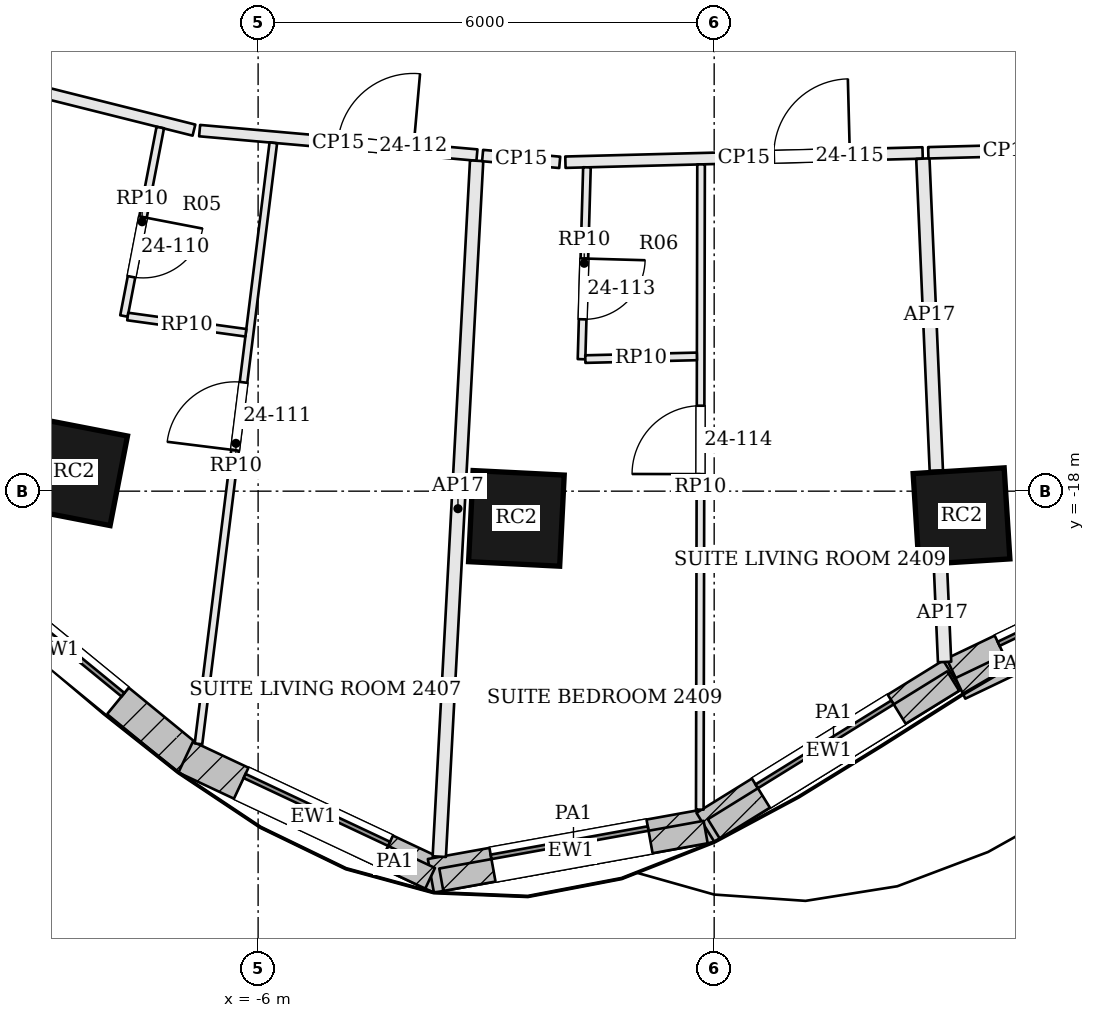
"""IFC4 building model, lengths in metres.
Left out: names, types, materials, properties, quantities, classifications, styles, units other than length and angle.
Written with IfcOpenShell. Run it as: python <this file> out.ifc"""

import sys

from ifc_helpers import new_model, si_unit, direction, frame, frame_2d, origin, origin_2d, place, context, subcontext, project, spatial, rectangle, extrude, element, fill, save


model = new_model("IFC4")
c1 = context("Model", 3, precision=1e-05, world=origin(), true_north=direction((0.0, 1.0)))
c2 = subcontext(c1, "Body", "Model", "MODEL_VIEW")
j1 = project(units=[si_unit("LENGTHUNIT", "METRE"), si_unit("PLANEANGLEUNIT", "RADIAN")], contexts=[c1])
p1 = place(None, origin())
s1 = spatial("IfcSite", under=j1, at=p1, CompositionType="ELEMENT")
p2 = place(p1, origin())
s2 = spatial("IfcBuilding", under=s1, at=p2, CompositionType="ELEMENT")
p3 = place(p2, frame((0.0, 0.0, 103.2)))
s3 = spatial("IfcBuildingStorey", under=s2, at=p3, CompositionType="ELEMENT", Elevation=103.2)
for number, where, z_axis, x_axis in (
    (1, (-8.422, -17.749, 0.0), (0.0, 0.0, 1.0), (0.982, -0.191, 0.0)),
    (2, (-2.602, -18.358, 0.0), (0.0, 0.0, 1.0), (0.999, -0.05, 0.0)),
    (3, (3.254, -18.33, 0.0), (0.0, 0.0, 1.0), (0.998, 0.063, 0.0)),
):
    element("IfcColumn", number, at=place(p3, frame(where, z_axis=z_axis, x_axis=x_axis)), inside=s3, PredefinedType="COLUMN", context=c2, shape_type="SweptSolid", body=[
        extrude(rectangle(XDim=1.2, YDim=1.2, at=origin_2d()), origin(), (0.0, 0.0, 1.0), 3.6),
    ])
p4 = place(p3, frame((-10.407, -18.661, 0.0), z_axis=(0.0, 0.0, 1.0), x_axis=(0.773702458947, -0.633549133864, 0.0)))
e4 = element("IfcWall", 4, at=p4, inside=s3, PredefinedType="SOLIDWALL", context=c2, shape_type="SweptSolid", body=[
    extrude(rectangle(XDim=4.526, YDim=0.45, at=frame_2d((2.263, 0.0))), origin(), (0.0, 0.0, 1.0), 3.4),
])
p5 = place(p4, frame((1.213, 0.0, 0.9)))
e5 = element("IfcOpeningElement", 5, at=p5, cuts=e4, PredefinedType="OPENING", context=c2, shape_type="SweptSolid", body=[
    extrude(rectangle(XDim=2.1, YDim=2.0, at=frame_2d((1.05, 1.0))), frame((0.0, 0.235, 0.0), z_axis=(0.0, -1.0, 0.0), x_axis=(1.0, 0.0, 0.0)), (0.0, 0.0, 1.0), 0.47),
])
p6 = place(p3, frame((-6.953, -21.499, 0.0), z_axis=(0.0, 0.0, 1.0), x_axis=(0.905034581957, -0.425337989676, 0.0)))
e6 = element("IfcWall", 6, at=p6, inside=s3, PredefinedType="SOLIDWALL", context=c2, shape_type="SweptSolid", body=[
    extrude(rectangle(XDim=3.714, YDim=0.45, at=frame_2d((1.857, 0.0))), origin(), (0.0, 0.0, 1.0), 3.4),
])
p7 = place(p6, frame((0.807, 0.0, 0.9)))
e7 = element("IfcOpeningElement", 7, at=p7, cuts=e6, PredefinedType="OPENING", context=c2, shape_type="SweptSolid", body=[
    extrude(rectangle(XDim=2.1, YDim=2.0, at=frame_2d((1.05, 1.0))), frame((0.0, 0.235, 0.0), z_axis=(0.0, -1.0, 0.0), x_axis=(1.0, 0.0, 0.0)), (0.0, 0.0, 1.0), 0.47),
])
p8 = place(p3, frame((-3.727, -23.061, 0.0), z_axis=(0.0, 0.0, 1.0), x_axis=(0.984119180424, 0.177508982087, 0.0)))
e8 = element("IfcWall", 8, at=p8, inside=s3, PredefinedType="SOLIDWALL", context=c2, shape_type="SweptSolid", body=[
    extrude(rectangle(XDim=3.747, YDim=0.45, at=frame_2d((1.873, 0.0))), origin(), (0.0, 0.0, 1.0), 3.4),
])
p9 = place(p8, frame((0.823, 0.0, 0.9)))
e9 = element("IfcOpeningElement", 9, at=p9, cuts=e8, PredefinedType="OPENING", context=c2, shape_type="SweptSolid", body=[
    extrude(rectangle(XDim=2.1, YDim=2.0, at=frame_2d((1.05, 1.0))), frame((0.0, 0.235, 0.0), z_axis=(0.0, -1.0, 0.0), x_axis=(1.0, 0.0, 0.0)), (0.0, 0.0, 1.0), 0.47),
])
p10 = place(p3, frame((-0.115, -22.424, 0.0), z_axis=(0.0, 0.0, 1.0), x_axis=(0.8506970368, 0.525656305564, 0.0)))
e10 = element("IfcWall", 10, at=p10, inside=s3, PredefinedType="SOLIDWALL", context=c2, shape_type="SweptSolid", body=[
    extrude(rectangle(XDim=3.816, YDim=0.45, at=frame_2d((1.908, 0.0))), origin(), (0.0, 0.0, 1.0), 3.4),
])
p11 = place(p10, frame((0.858, 0.0, 0.9)))
e11 = element("IfcOpeningElement", 11, at=p11, cuts=e10, PredefinedType="OPENING", context=c2, shape_type="SweptSolid", body=[
    extrude(rectangle(XDim=2.1, YDim=2.0, at=frame_2d((1.05, 1.0))), frame((0.0, 0.235, 0.0), z_axis=(0.0, -1.0, 0.0), x_axis=(1.0, 0.0, 0.0)), (0.0, 0.0, 1.0), 0.47),
])
p12 = place(p3, frame((3.154, -20.406, 0.0), z_axis=(0.0, 0.0, 1.0), x_axis=(0.902333313, 0.431038968367, 0.0)))
e12 = element("IfcWall", 12, at=p12, inside=s3, PredefinedType="SOLIDWALL", context=c2, shape_type="SweptSolid", body=[
    extrude(rectangle(XDim=3.505, YDim=0.45, at=frame_2d((1.753, 0.0))), origin(), (0.0, 0.0, 1.0), 3.4),
])
p13 = place(p12, frame((0.703, 0.0, 0.9)))
e13 = element("IfcOpeningElement", 13, at=p13, cuts=e12, PredefinedType="OPENING", context=c2, shape_type="SweptSolid", body=[
    extrude(rectangle(XDim=2.1, YDim=2.0, at=frame_2d((1.05, 1.0))), frame((0.0, 0.235, 0.0), z_axis=(0.0, -1.0, 0.0), x_axis=(1.0, 0.0, 0.0)), (0.0, 0.0, 1.0), 0.47),
])
p14 = place(p3, frame((-4.667, -22.656, 3.6), z_axis=(0.0, 0.0, 1.0), x_axis=(0.905050240273, -0.425304670304, 0.0)))
e14 = element("IfcWall", 14, at=p14, inside=s3, PredefinedType="PARAPET", context=c2, shape_type="SweptSolid", body=[
    extrude(rectangle(XDim=1.027, YDim=0.3, at=frame_2d((0.513, 0.0))), origin(), (0.0, 0.0, 1.0), 1.1),
])
p15 = place(p3, frame((-3.59, -23.112, 3.6), z_axis=(0.0, 0.0, 1.0), x_axis=(0.984124248147, 0.177480884064, 0.0)))
e15 = element("IfcWall", 15, at=p15, inside=s3, PredefinedType="PARAPET", context=c2, shape_type="SweptSolid", body=[
    extrude(rectangle(XDim=3.534, YDim=0.3, at=frame_2d((1.767, 0.0))), origin(), (0.0, 0.0, 1.0), 1.1),
])
p16 = place(p3, frame((-0.005, -22.444, 3.6), z_axis=(0.0, 0.0, 1.0), x_axis=(0.850710394144, 0.525634688063, 0.0)))
e16 = element("IfcWall", 16, at=p16, inside=s3, PredefinedType="PARAPET", context=c2, shape_type="SweptSolid", body=[
    extrude(rectangle(XDim=3.702, YDim=0.3, at=frame_2d((1.851, 0.0))), origin(), (0.0, 0.0, 1.0), 1.1),
])
p17 = place(p3, frame((3.239, -20.594, 3.6), z_axis=(0.0, 0.0, 1.0), x_axis=(0.902344893923, 0.431014724123, 0.0)))
e17 = element("IfcWall", 17, at=p17, inside=s3, PredefinedType="PARAPET", context=c2, shape_type="SweptSolid", body=[
    extrude(rectangle(XDim=1.49, YDim=0.3, at=frame_2d((0.745, 0.0))), origin(), (0.0, 0.0, 1.0), 1.1),
])
p18 = place(p3, frame((-11.387, -12.111, 0.0), z_axis=(0.0, 0.0, 1.0), x_axis=(0.96999205549, -0.243136612393, 0.0)))
e18 = element("IfcWall", 18, at=p18, inside=s3, PredefinedType="PARTITIONING", context=c2, shape_type="SweptSolid", body=[
    extrude(rectangle(XDim=4.683, YDim=0.15, at=frame_2d((2.342, 0.0))), origin(), (0.0, 0.0, 1.0), 2.784),
])
p19 = place(p3, frame((-6.77, -13.257, 0.0), z_axis=(0.0, 0.0, 1.0), x_axis=(0.996139113685, -0.087788758881, 0.0)))
e19 = element("IfcWall", 19, at=p19, inside=s3, PredefinedType="PARTITIONING", context=c2, shape_type="SweptSolid", body=[
    extrude(rectangle(XDim=3.663, YDim=0.15, at=frame_2d((1.831, 0.0))), origin(), (0.0, 0.0, 1.0), 2.784),
])
p20 = place(p19, frame((1.823, 0.0, 0.0)))
e20 = element("IfcOpeningElement", 20, at=p20, cuts=e19, PredefinedType="OPENING", context=c2, shape_type="SweptSolid", body=[
    extrude(rectangle(XDim=1.0, YDim=2.1, at=frame_2d((0.5, 1.05))), frame((0.0, 0.085, 0.0), z_axis=(0.0, -1.0, 0.0), x_axis=(1.0, 0.0, 0.0)), (0.0, 0.0, 1.0), 0.17),
])
p21 = place(p3, frame((-3.616, -22.808, 0.0), z_axis=(0.0, 0.0, 1.0), x_axis=(0.053604251486, 0.998562258561, 0.0)))
e21 = element("IfcWall", 21, at=p21, inside=s3, PredefinedType="PARTITIONING", context=c2, shape_type="SweptSolid", body=[
    extrude(rectangle(XDim=9.168, YDim=0.175, at=frame_2d((4.584, 0.0))), origin(), (0.0, 0.0, 1.0), 2.784),
])
p22 = place(p3, frame((-3.046, -13.585, 0.0), z_axis=(0.0, 0.0, 1.0), x_axis=(0.99614280397, -0.087746875151, 0.0)))
e22 = element("IfcWall", 22, at=p22, inside=s3, PredefinedType="PARTITIONING", context=c2, shape_type="SweptSolid", body=[
    extrude(rectangle(XDim=1.018, YDim=0.15, at=frame_2d((0.509, 0.0))), origin(), (0.0, 0.0, 1.0), 2.784),
])
p23 = place(p3, frame((-1.957, -13.672, 0.0), z_axis=(0.0, 0.0, 1.0), x_axis=(0.99966412241, 0.025916063855, 0.0)))
e23 = element("IfcWall", 23, at=p23, inside=s3, PredefinedType="PARTITIONING", context=c2, shape_type="SweptSolid", body=[
    extrude(rectangle(XDim=4.701, YDim=0.15, at=frame_2d((2.35, 0.0))), origin(), (0.0, 0.0, 1.0), 2.784),
])
p24 = place(p23, frame((2.743, 0.0, 0.0)))
e24 = element("IfcOpeningElement", 24, at=p24, cuts=e23, PredefinedType="OPENING", context=c2, shape_type="SweptSolid", body=[
    extrude(rectangle(XDim=1.0, YDim=2.1, at=frame_2d((0.5, 1.05))), frame((0.0, 0.085, 0.0), z_axis=(0.0, -1.0, 0.0), x_axis=(1.0, 0.0, 0.0)), (0.0, 0.0, 1.0), 0.17),
])
p25 = place(p3, frame((3.031, -20.247, 0.0), z_axis=(0.0, 0.0, 1.0), x_axis=(-0.043114350308, 0.999070144083, 0.0)))
e25 = element("IfcWall", 25, at=p25, inside=s3, PredefinedType="PARTITIONING", context=c2, shape_type="SweptSolid", body=[
    extrude(rectangle(XDim=1.28, YDim=0.175, at=frame_2d((0.64, 0.0))), origin(), (0.0, 0.0, 1.0), 2.784),
])
p26 = place(p3, frame((2.923, -17.729, 0.0), z_axis=(0.0, 0.0, 1.0), x_axis=(-0.043145793773, 0.999068786661, 0.0)))
e26 = element("IfcWall", 26, at=p26, inside=s3, PredefinedType="PARTITIONING", context=c2, shape_type="SweptSolid", body=[
    extrude(rectangle(XDim=4.108, YDim=0.175, at=frame_2d((2.054, 0.0))), origin(), (0.0, 0.0, 1.0), 2.784),
])
p27 = place(p3, frame((2.817, -13.548, 0.0), z_axis=(0.0, 0.0, 1.0), x_axis=(0.999665667544, 0.025856394436, 0.0)))
e27 = element("IfcWall", 27, at=p27, inside=s3, PredefinedType="PARTITIONING", context=c2, shape_type="SweptSolid", body=[
    extrude(rectangle(XDim=2.125, YDim=0.15, at=frame_2d((1.062, 0.0))), origin(), (0.0, 0.0, 1.0), 2.784),
])
p28 = place(p3, frame((-6.784, -21.325, 0.0), z_axis=(0.0, 0.0, 1.0), x_axis=(0.123563365561, 0.992336684141, 0.0)))
e28 = element("IfcWall", 28, at=p28, inside=s3, PredefinedType="PARTITIONING", context=c2, shape_type="SweptSolid", body=[
    extrude(rectangle(XDim=7.969, YDim=0.1, at=frame_2d((3.984, 0.0))), origin(), (0.0, 0.0, 1.0), 2.784),
])
p29 = place(p28, frame((3.893, 0.0, 0.0)))
e29 = element("IfcOpeningElement", 29, at=p29, cuts=e28, PredefinedType="OPENING", context=c2, shape_type="SweptSolid", body=[
    extrude(rectangle(XDim=0.9, YDim=2.4, at=frame_2d((0.45, 1.2))), frame((0.0, 0.06, 0.0), z_axis=(0.0, -1.0, 0.0), x_axis=(1.0, 0.0, 0.0)), (0.0, 0.0, 1.0), 0.12),
])
p30 = place(p3, frame((-7.287, -13.216, 0.0), z_axis=(0.0, 0.0, 1.0), x_axis=(-0.189119930845, -0.981953996762, 0.0)))
e30 = element("IfcWall", 30, at=p30, inside=s3, PredefinedType="PARTITIONING", context=c2, shape_type="SweptSolid", body=[
    extrude(rectangle(XDim=2.525, YDim=0.1, at=frame_2d((1.263, 0.0))), origin(), (0.0, 0.0, 1.0), 2.784),
])
p31 = place(p30, frame((1.2, 0.0, 0.0)))
e31 = element("IfcOpeningElement", 31, at=p31, cuts=e30, PredefinedType="OPENING", context=c2, shape_type="SweptSolid", body=[
    extrude(rectangle(XDim=0.8, YDim=2.1, at=frame_2d((0.4, 1.05))), frame((0.0, 0.06, 0.0), z_axis=(0.0, -1.0, 0.0), x_axis=(1.0, 0.0, 0.0)), (0.0, 0.0, 1.0), 0.12),
])
p32 = place(p3, frame((-7.715, -15.702, 0.0), z_axis=(0.0, 0.0, 1.0), x_axis=(0.990661766578, -0.136342452085, 0.0)))
e32 = element("IfcWall", 32, at=p32, inside=s3, PredefinedType="PARTITIONING", context=c2, shape_type="SweptSolid", body=[
    extrude(rectangle(XDim=1.569, YDim=0.1, at=frame_2d((0.784, 0.0))), origin(), (0.0, 0.0, 1.0), 2.784),
])
p33 = place(p3, frame((-0.189, -22.19, 0.0), z_axis=(0.0, 0.0, 1.0), x_axis=(0.001984465463, 0.999998030946, 0.0)))
e33 = element("IfcWall", 33, at=p33, inside=s3, PredefinedType="PARTITIONING", context=c2, shape_type="SweptSolid", body=[
    extrude(rectangle(XDim=8.489, YDim=0.1, at=frame_2d((4.244, 0.0))), origin(), (0.0, 0.0, 1.0), 2.784),
])
p34 = place(p33, frame((4.414, 0.0, 0.0)))
e34 = element("IfcOpeningElement", 34, at=p34, cuts=e33, PredefinedType="OPENING", context=c2, shape_type="SweptSolid", body=[
    extrude(rectangle(XDim=0.9, YDim=2.4, at=frame_2d((0.45, 1.2))), frame((0.0, 0.06, 0.0), z_axis=(0.0, -1.0, 0.0), x_axis=(1.0, 0.0, 0.0)), (0.0, 0.0, 1.0), 0.12),
])
p35 = place(p3, frame((-1.674, -13.74, 0.0), z_axis=(0.0, 0.0, 1.0), x_axis=(-0.02823404829, -0.999601339794, 0.0)))
e35 = element("IfcWall", 35, at=p35, inside=s3, PredefinedType="PARTITIONING", context=c2, shape_type="SweptSolid", body=[
    extrude(rectangle(XDim=2.525, YDim=0.1, at=frame_2d((1.262, 0.0))), origin(), (0.0, 0.0, 1.0), 2.784),
])
p36 = place(p35, frame((1.2, 0.0, 0.0)))
e36 = element("IfcOpeningElement", 36, at=p36, cuts=e35, PredefinedType="OPENING", context=c2, shape_type="SweptSolid", body=[
    extrude(rectangle(XDim=0.8, YDim=2.1, at=frame_2d((0.4, 1.05))), frame((0.0, 0.06, 0.0), z_axis=(0.0, -1.0, 0.0), x_axis=(1.0, 0.0, 0.0)), (0.0, 0.0, 1.0), 0.12),
])
p37 = place(p3, frame((-1.695, -16.262, 0.0), z_axis=(0.0, 0.0, 1.0), x_axis=(0.9997092775, 0.024111418037, 0.0)))
e37 = element("IfcWall", 37, at=p37, inside=s3, PredefinedType="PARTITIONING", context=c2, shape_type="SweptSolid", body=[
    extrude(rectangle(XDim=1.468, YDim=0.1, at=frame_2d((0.734, 0.0))), origin(), (0.0, 0.0, 1.0), 2.784),
])
p38 = place(p5, origin())
e38 = element("IfcWindow", 38, at=p38, inside=s3, PartitioningType="SINGLE_PANEL", PredefinedType="WINDOW", context=c2, shape_type="SweptSolid", body=[
    extrude(rectangle(XDim=2.1, YDim=2.0, at=frame_2d((1.05, 1.0))), frame((0.0, 0.135, 0.0), z_axis=(0.0, -1.0, 0.0), x_axis=(1.0, 0.0, 0.0)), (0.0, 0.0, 1.0), 0.06),
])
fill(e5, e38)
p39 = place(p7, origin())
e39 = element("IfcWindow", 39, at=p39, inside=s3, PartitioningType="SINGLE_PANEL", PredefinedType="WINDOW", context=c2, shape_type="SweptSolid", body=[
    extrude(rectangle(XDim=2.1, YDim=2.0, at=frame_2d((1.05, 1.0))), frame((0.0, 0.135, 0.0), z_axis=(0.0, -1.0, 0.0), x_axis=(1.0, 0.0, 0.0)), (0.0, 0.0, 1.0), 0.06),
])
fill(e7, e39)
p40 = place(p9, origin())
e40 = element("IfcWindow", 40, at=p40, inside=s3, PartitioningType="SINGLE_PANEL", PredefinedType="WINDOW", context=c2, shape_type="SweptSolid", body=[
    extrude(rectangle(XDim=2.1, YDim=2.0, at=frame_2d((1.05, 1.0))), frame((0.0, 0.135, 0.0), z_axis=(0.0, -1.0, 0.0), x_axis=(1.0, 0.0, 0.0)), (0.0, 0.0, 1.0), 0.06),
])
fill(e9, e40)
p41 = place(p11, origin())
e41 = element("IfcWindow", 41, at=p41, inside=s3, PartitioningType="SINGLE_PANEL", PredefinedType="WINDOW", context=c2, shape_type="SweptSolid", body=[
    extrude(rectangle(XDim=2.1, YDim=2.0, at=frame_2d((1.05, 1.0))), frame((0.0, 0.135, 0.0), z_axis=(0.0, -1.0, 0.0), x_axis=(1.0, 0.0, 0.0)), (0.0, 0.0, 1.0), 0.06),
])
fill(e11, e41)
p42 = place(p13, origin())
e42 = element("IfcWindow", 42, at=p42, inside=s3, PartitioningType="SINGLE_PANEL", PredefinedType="WINDOW", context=c2, shape_type="SweptSolid", body=[
    extrude(rectangle(XDim=2.1, YDim=2.0, at=frame_2d((1.05, 1.0))), frame((0.0, 0.135, 0.0), z_axis=(0.0, -1.0, 0.0), x_axis=(1.0, 0.0, 0.0)), (0.0, 0.0, 1.0), 0.06),
])
fill(e13, e42)
p43 = place(p31, origin())
e43 = element("IfcDoor", 43, at=p43, inside=s3, OperationType="SINGLE_SWING_LEFT", PredefinedType="DOOR", context=c2, shape_type="SweptSolid", body=[
    extrude(rectangle(XDim=0.8, YDim=2.1, at=frame_2d((0.4, 1.05))), frame((0.0, 0.025, 0.0), z_axis=(0.0, -1.0, 0.0), x_axis=(1.0, 0.0, 0.0)), (0.0, 0.0, 1.0), 0.05),
])
fill(e31, e43)
p44 = place(p29, origin())
e44 = element("IfcDoor", 44, at=p44, inside=s3, OperationType="SINGLE_SWING_LEFT", PredefinedType="DOOR", context=c2, shape_type="SweptSolid", body=[
    extrude(rectangle(XDim=0.9, YDim=2.4, at=frame_2d((0.45, 1.2))), frame((0.0, 0.025, 0.0), z_axis=(0.0, -1.0, 0.0), x_axis=(1.0, 0.0, 0.0)), (0.0, 0.0, 1.0), 0.05),
])
fill(e29, e44)
p45 = place(p20, origin())
e45 = element("IfcDoor", 45, at=p45, inside=s3, OperationType="SINGLE_SWING_RIGHT", PredefinedType="DOOR", context=c2, shape_type="SweptSolid", body=[
    extrude(rectangle(XDim=1.0, YDim=2.1, at=frame_2d((0.5, 1.05))), frame((0.0, 0.025, 0.0), z_axis=(0.0, -1.0, 0.0), x_axis=(1.0, 0.0, 0.0)), (0.0, 0.0, 1.0), 0.05),
])
fill(e20, e45)
p46 = place(p36, origin())
e46 = element("IfcDoor", 46, at=p46, inside=s3, OperationType="SINGLE_SWING_LEFT", PredefinedType="DOOR", context=c2, shape_type="SweptSolid", body=[
    extrude(rectangle(XDim=0.8, YDim=2.1, at=frame_2d((0.4, 1.05))), frame((0.0, 0.025, 0.0), z_axis=(0.0, -1.0, 0.0), x_axis=(1.0, 0.0, 0.0)), (0.0, 0.0, 1.0), 0.05),
])
fill(e36, e46)
p47 = place(p34, origin())
e47 = element("IfcDoor", 47, at=p47, inside=s3, OperationType="SINGLE_SWING_LEFT", PredefinedType="DOOR", context=c2, shape_type="SweptSolid", body=[
    extrude(rectangle(XDim=0.9, YDim=2.4, at=frame_2d((0.45, 1.2))), frame((0.0, 0.025, 0.0), z_axis=(0.0, -1.0, 0.0), x_axis=(1.0, 0.0, 0.0)), (0.0, 0.0, 1.0), 0.05),
])
fill(e34, e47)
p48 = place(p24, origin())
e48 = element("IfcDoor", 48, at=p48, inside=s3, OperationType="SINGLE_SWING_RIGHT", PredefinedType="DOOR", context=c2, shape_type="SweptSolid", body=[
    extrude(rectangle(XDim=1.0, YDim=2.1, at=frame_2d((0.5, 1.05))), frame((0.0, 0.025, 0.0), z_axis=(0.0, -1.0, 0.0), x_axis=(1.0, 0.0, 0.0)), (0.0, 0.0, 1.0), 0.05),
])
fill(e24, e48)
save(model, sys.argv[1])
